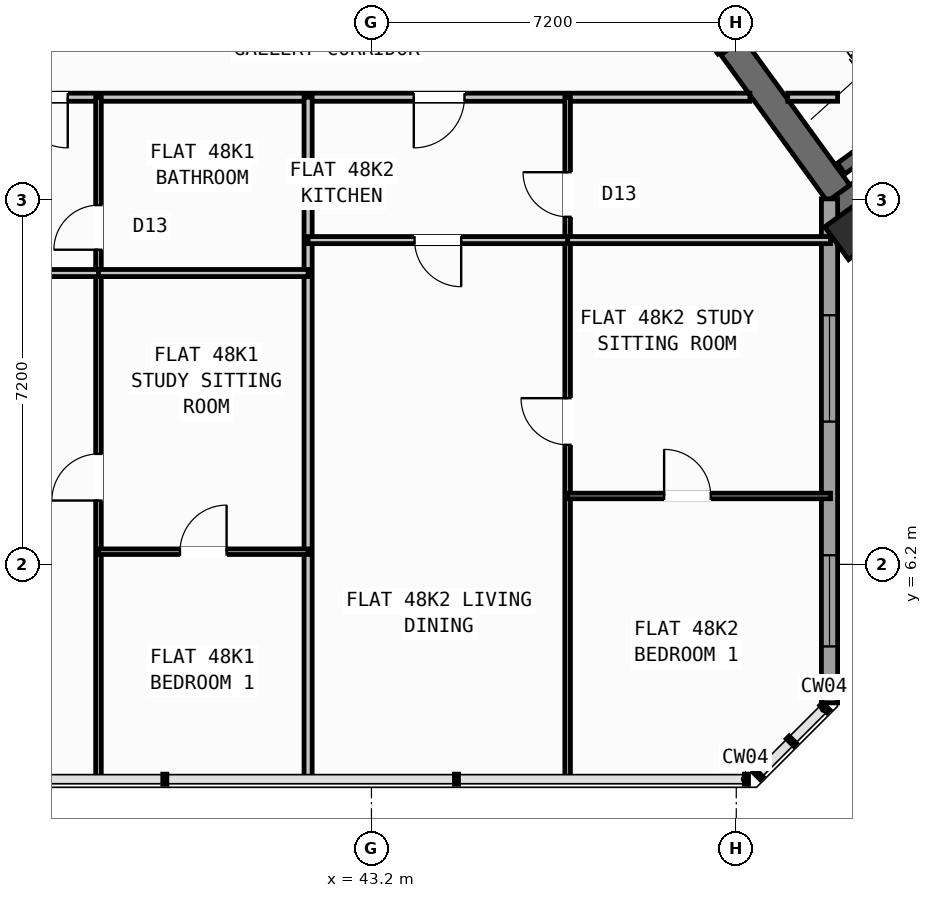
"""IFC4 building model, lengths in metres.
Left out: names, types, materials, properties, quantities, classifications, styles, units other than length and angle.
Written with IfcOpenShell. Run it as: python <this file> out.ifc"""

import sys

from ifc_helpers import new_model, si_unit, direction, frame, frame_2d, origin, origin_2d, place, context, subcontext, project, spatial, rectangle, hollow_rectangle, extrude, source, transform, mapped, element, fill, save


model = new_model("IFC4")
c1 = context("Model", 3, precision=1e-05, world=origin(), true_north=direction((0.0, 1.0)))
c2 = subcontext(c1, "Body", "Model", "MODEL_VIEW")
j1 = project(units=[si_unit("LENGTHUNIT", "METRE"), si_unit("PLANEANGLEUNIT", "RADIAN")], contexts=[c1])
p1 = place(None, origin())
s1 = spatial("IfcSite", under=j1, at=p1, CompositionType="ELEMENT")
p2 = place(p1, origin())
s2 = spatial("IfcBuilding", under=s1, at=p2, CompositionType="ELEMENT")
p3 = place(p2, frame((0.0, 0.0, 191.4)))
s3 = spatial("IfcBuildingStorey", under=s2, at=p3, CompositionType="ELEMENT", Elevation=191.4)
p4 = place(p3, frame((36.683, 18.304, 0.0), z_axis=(0.0, 0.0, 1.0), x_axis=(-0.529896466841, -0.848062341122, 0.0)))
e1 = element("IfcWall", 1, at=p4, inside=s3, PredefinedType="SHEAR", context=c2, shape_type="SweptSolid", body=[
    extrude(rectangle(XDim=6.425, YDim=0.55, at=frame_2d((3.212, 0.0))), origin(), (0.0, 0.0, 1.0), 3.32),
])
p5 = place(p3, frame((52.359, 13.14, 0.0), z_axis=(0.0, 0.0, 1.0), x_axis=(0.809014896919, 0.587788139183, 0.0)))
e2 = element("IfcWall", 2, at=p5, inside=s3, PredefinedType="SHEAR", context=c2, shape_type="SweptSolid", body=[
    extrude(rectangle(XDim=12.34, YDim=0.55, at=frame_2d((6.17, 0.0))), origin(), (0.0, 0.0, 1.0), 3.32),
])
p6 = place(p3, frame((52.42, 13.524, 0.0), z_axis=(0.0, 0.0, 1.0), x_axis=(-0.587802113096, 0.809004744015, 0.0)))
e3 = element("IfcWall", 3, at=p6, inside=s3, PredefinedType="SHEAR", context=c2, shape_type="SweptSolid", body=[
    extrude(rectangle(XDim=3.575, YDim=0.55, at=frame_2d((1.788, 0.0))), origin(), (0.0, 0.0, 1.0), 3.32),
])
m1 = source(origin(), c2, "Body", "SweptSolid", [
    extrude(hollow_rectangle(XDim=0.8, YDim=0.8, WallThickness=0.032, at=origin_2d()), origin(), (0.0, 0.0, 1.0), 3.6),
])
p7 = place(p3, frame((52.705, 12.773, 0.0), z_axis=(0.0, 0.0, 1.0), x_axis=(0.809016994375, 0.587785252292, 0.0)))
e4 = element("IfcColumn", 4, at=p7, inside=s3, PredefinedType="COLUMN", context=c2, shape_type="MappedRepresentation", body=[
    mapped(m1, transform((0.0, 0.0, 0.0), scale=1.0)),
])
p8 = place(p3, frame((52.24, 13.414, 0.0), z_axis=(0.0, 0.0, 1.0), x_axis=(0.0, -1.0, 0.0)))
e5 = element("IfcWall", 5, at=p8, inside=s3, PredefinedType="STANDARD", context=c2, shape_type="SweptSolid", body=[
    extrude(rectangle(XDim=9.948, YDim=0.32, at=frame_2d((4.974, 0.0))), origin(), (0.0, 0.0, 1.0), 3.32),
])
p9 = place(p8, frame((2.296, 0.0, 0.8)))
e6 = element("IfcOpeningElement", 6, at=p9, cuts=e5, PredefinedType="OPENING", context=c2, shape_type="SweptSolid", body=[
    extrude(rectangle(XDim=2.1, YDim=1.55, at=frame_2d((1.05, 0.775))), frame((0.0, 0.17, 0.0), z_axis=(0.0, -1.0, 0.0), x_axis=(1.0, 0.0, 0.0)), (0.0, 0.0, 1.0), 0.34),
])
p10 = place(p8, frame((7.033, 0.0, 0.85)))
e7 = element("IfcOpeningElement", 7, at=p10, cuts=e5, PredefinedType="OPENING", context=c2, shape_type="SweptSolid", body=[
    extrude(rectangle(XDim=1.8, YDim=1.5, at=frame_2d((0.9, 0.75))), frame((0.0, 0.17, 0.0), z_axis=(0.0, -1.0, 0.0), x_axis=(1.0, 0.0, 0.0)), (0.0, 0.0, 1.0), 0.34),
])
p11 = place(p3, frame((52.472, 14.013, 0.0), z_axis=(0.0, 0.0, 1.0), x_axis=(0.809028366311, 0.587769599847, 0.0)))
e8 = element("IfcWall", 8, at=p11, inside=s3, PredefinedType="SHEAR", context=c2, shape_type="SweptSolid", body=[
    extrude(rectangle(XDim=7.33, YDim=0.26, at=frame_2d((3.665, 0.0))), origin(), (0.0, 0.0, 1.0), 3.32),
])
p12 = place(p3, frame((35.237, 15.42, 0.0), z_axis=(0.0, 0.0, 1.0), x_axis=(1.0, 0.0, 0.0)))
e9 = element("IfcWall", 9, at=p12, inside=s3, PredefinedType="PARTITIONING", context=c2, shape_type="SweptSolid", body=[
    extrude(rectangle(XDim=15.432, YDim=0.16, at=frame_2d((7.716, 0.0))), origin(), (0.0, 0.0, 1.0), 3.31),
])
p13 = place(p12, frame((0.969, 0.0, 0.0)))
e10 = element("IfcOpeningElement", 10, at=p13, cuts=e9, PredefinedType="OPENING", context=c2, shape_type="SweptSolid", body=[
    extrude(rectangle(XDim=1.0, YDim=2.1, at=frame_2d((0.5, 1.05))), frame((0.0, 0.09, 0.0), z_axis=(0.0, -1.0, 0.0), x_axis=(1.0, 0.0, 0.0)), (0.0, 0.0, 1.0), 0.18),
])
p14 = place(p12, frame((8.799, 0.0, 0.0)))
e11 = element("IfcOpeningElement", 11, at=p14, cuts=e9, PredefinedType="OPENING", context=c2, shape_type="SweptSolid", body=[
    extrude(rectangle(XDim=1.0, YDim=2.1, at=frame_2d((0.5, 1.05))), frame((0.0, 0.09, 0.0), z_axis=(0.0, -1.0, 0.0), x_axis=(1.0, 0.0, 0.0)), (0.0, 0.0, 1.0), 0.18),
])
p15 = place(p3, frame((51.416, 15.42, 0.0), z_axis=(0.0, 0.0, 1.0), x_axis=(1.0, 0.0, 0.0)))
e12 = element("IfcWall", 12, at=p15, inside=s3, PredefinedType="PARTITIONING", context=c2, shape_type="SweptSolid", body=[
    extrude(rectangle(XDim=0.984, YDim=0.16, at=frame_2d((0.492, 0.0))), origin(), (0.0, 0.0, 1.0), 3.31),
])
p16 = place(p3, frame((50.119, 16.333, 0.0), z_axis=(0.0, 0.0, 1.0), x_axis=(-0.587749856981, 0.809042709391, 0.0)))
e13 = element("IfcWall", 13, at=p16, inside=s3, PredefinedType="STANDARD", context=c2, shape_type="SweptSolid", body=[
    extrude(rectangle(XDim=2.96, YDim=0.2, at=frame_2d((1.48, 0.0))), origin(), (0.0, 0.0, 1.0), 3.31),
])
p17 = place(p16, frame((0.53, 0.0, 0.0)))
e14 = element("IfcOpeningElement", 14, at=p17, cuts=e13, PredefinedType="OPENING", context=c2, shape_type="SweptSolid", body=[
    extrude(rectangle(XDim=1.5, YDim=2.15, at=frame_2d((0.75, 1.075))), frame((0.0, 0.11, 0.0), z_axis=(0.0, -1.0, 0.0), x_axis=(1.0, 0.0, 0.0)), (0.0, 0.0, 1.0), 0.22),
])
p18 = place(p3, frame((41.95, 1.96, 0.0), z_axis=(0.0, 0.0, 1.0), x_axis=(0.0, 1.0, 0.0)))
e15 = element("IfcWall", 15, at=p18, inside=s3, PredefinedType="PARTITIONING", context=c2, shape_type="SweptSolid", body=[
    extrude(rectangle(XDim=13.46, YDim=0.16, at=frame_2d((6.73, 0.0))), origin(), (0.0, 0.0, 1.0), 3.31),
])
p19 = place(p3, frame((37.813, 1.96, 0.0), z_axis=(0.0, 0.0, 1.0), x_axis=(0.0, 1.0, 0.0)))
e16 = element("IfcWall", 16, at=p19, inside=s3, PredefinedType="PARTITIONING", context=c2, shape_type="SweptSolid", body=[
    extrude(rectangle(XDim=13.46, YDim=0.11, at=frame_2d((6.73, 0.0))), origin(), (0.0, 0.0, 1.0), 3.31),
])
p20 = place(p19, frame((5.5, 0.0, 0.0)))
e17 = element("IfcOpeningElement", 17, at=p20, cuts=e16, PredefinedType="OPENING", context=c2, shape_type="SweptSolid", body=[
    extrude(rectangle(XDim=0.92, YDim=2.08, at=frame_2d((0.46, 1.04))), frame((0.0, 0.065, 0.0), z_axis=(0.0, -1.0, 0.0), x_axis=(1.0, 0.0, 0.0)), (0.0, 0.0, 1.0), 0.13),
])
p21 = place(p19, frame((10.45, 0.0, 0.0)))
e18 = element("IfcOpeningElement", 18, at=p21, cuts=e16, PredefinedType="OPENING", context=c2, shape_type="SweptSolid", body=[
    extrude(rectangle(XDim=0.88, YDim=2.08, at=frame_2d((0.44, 1.04))), frame((0.0, 0.065, 0.0), z_axis=(0.0, -1.0, 0.0), x_axis=(1.0, 0.0, 0.0)), (0.0, 0.0, 1.0), 0.13),
])
p22 = place(p3, frame((33.447, 11.95, 0.0), z_axis=(0.0, 0.0, 1.0), x_axis=(1.0, 0.0, 0.0)))
e19 = element("IfcWall", 19, at=p22, inside=s3, PredefinedType="PLUMBINGWALL", context=c2, shape_type="SweptSolid", body=[
    extrude(rectangle(XDim=4.366, YDim=0.14, at=frame_2d((2.183, 0.0))), origin(), (0.0, 0.0, 1.0), 2.495),
])
p23 = place(p22, frame((1.05, 0.0, 0.0)))
e20 = element("IfcOpeningElement", 20, at=p23, cuts=e19, PredefinedType="OPENING", context=c2, shape_type="SweptSolid", body=[
    extrude(rectangle(XDim=0.92, YDim=2.08, at=frame_2d((0.46, 1.04))), frame((0.0, 0.08, 0.0), z_axis=(0.0, -1.0, 0.0), x_axis=(1.0, 0.0, 0.0)), (0.0, 0.0, 1.0), 0.16),
])
p24 = place(p3, frame((37.813, 11.95, 0.0), z_axis=(0.0, 0.0, 1.0), x_axis=(1.0, 0.0, 0.0)))
e21 = element("IfcWall", 21, at=p24, inside=s3, PredefinedType="PLUMBINGWALL", context=c2, shape_type="SweptSolid", body=[
    extrude(rectangle(XDim=4.137, YDim=0.14, at=frame_2d((2.068, 0.0))), origin(), (0.0, 0.0, 1.0), 2.495),
])
p25 = place(p3, frame((37.813, 6.45, 0.0), z_axis=(0.0, 0.0, 1.0), x_axis=(1.0, 0.0, 0.0)))
e22 = element("IfcWall", 22, at=p25, inside=s3, PredefinedType="PARTITIONING", context=c2, shape_type="SweptSolid", body=[
    extrude(rectangle(XDim=4.137, YDim=0.11, at=frame_2d((2.068, 0.0))), origin(), (0.0, 0.0, 1.0), 3.31),
])
p26 = place(p25, frame((1.608, 0.0, 0.0)))
e23 = element("IfcOpeningElement", 23, at=p26, cuts=e22, PredefinedType="OPENING", context=c2, shape_type="SweptSolid", body=[
    extrude(rectangle(XDim=0.92, YDim=2.08, at=frame_2d((0.46, 1.04))), frame((0.0, 0.065, 0.0), z_axis=(0.0, -1.0, 0.0), x_axis=(1.0, 0.0, 0.0)), (0.0, 0.0, 1.0), 0.13),
])
p27 = place(p3, frame((47.072, 1.96, 0.0), z_axis=(0.0, 0.0, 1.0), x_axis=(0.0, 1.0, 0.0)))
e24 = element("IfcWall", 24, at=p27, inside=s3, PredefinedType="PARTITIONING", context=c2, shape_type="SweptSolid", body=[
    extrude(rectangle(XDim=13.46, YDim=0.11, at=frame_2d((6.73, 0.0))), origin(), (0.0, 0.0, 1.0), 3.31),
])
p28 = place(p27, frame((6.6, 0.0, 0.0)))
e25 = element("IfcOpeningElement", 25, at=p28, cuts=e24, PredefinedType="OPENING", context=c2, shape_type="SweptSolid", body=[
    extrude(rectangle(XDim=0.92, YDim=2.08, at=frame_2d((0.46, 1.04))), frame((0.0, 0.065, 0.0), z_axis=(0.0, -1.0, 0.0), x_axis=(1.0, 0.0, 0.0)), (0.0, 0.0, 1.0), 0.13),
])
p29 = place(p27, frame((11.1, 0.0, 0.0)))
e26 = element("IfcOpeningElement", 26, at=p29, cuts=e24, PredefinedType="OPENING", context=c2, shape_type="SweptSolid", body=[
    extrude(rectangle(XDim=0.88, YDim=2.08, at=frame_2d((0.44, 1.04))), frame((0.0, 0.065, 0.0), z_axis=(0.0, -1.0, 0.0), x_axis=(1.0, 0.0, 0.0)), (0.0, 0.0, 1.0), 0.13),
])
p30 = place(p3, frame((41.95, 12.6, 0.0), z_axis=(0.0, 0.0, 1.0), x_axis=(1.0, 0.0, 0.0)))
e27 = element("IfcWall", 27, at=p30, inside=s3, PredefinedType="PLUMBINGWALL", context=c2, shape_type="SweptSolid", body=[
    extrude(rectangle(XDim=5.122, YDim=0.14, at=frame_2d((2.561, 0.0))), origin(), (0.0, 0.0, 1.0), 2.495),
])
p31 = place(p30, frame((2.101, 0.0, 0.0)))
e28 = element("IfcOpeningElement", 28, at=p31, cuts=e27, PredefinedType="OPENING", context=c2, shape_type="SweptSolid", body=[
    extrude(rectangle(XDim=0.92, YDim=2.08, at=frame_2d((0.46, 1.04))), frame((0.0, 0.08, 0.0), z_axis=(0.0, -1.0, 0.0), x_axis=(1.0, 0.0, 0.0)), (0.0, 0.0, 1.0), 0.16),
])
p32 = place(p3, frame((47.072, 12.6, 0.0), z_axis=(0.0, 0.0, 1.0), x_axis=(1.0, 0.0, 0.0)))
e29 = element("IfcWall", 29, at=p32, inside=s3, PredefinedType="PLUMBINGWALL", context=c2, shape_type="SweptSolid", body=[
    extrude(rectangle(XDim=5.188, YDim=0.14, at=frame_2d((2.594, 0.0))), origin(), (0.0, 0.0, 1.0), 2.495),
])
p33 = place(p3, frame((47.072, 7.55, 0.0), z_axis=(0.0, 0.0, 1.0), x_axis=(1.0, 0.0, 0.0)))
e30 = element("IfcWall", 30, at=p33, inside=s3, PredefinedType="PARTITIONING", context=c2, shape_type="SweptSolid", body=[
    extrude(rectangle(XDim=5.188, YDim=0.11, at=frame_2d((2.594, 0.0))), origin(), (0.0, 0.0, 1.0), 3.31),
])
p34 = place(p33, frame((1.904, 0.0, 0.0)))
e31 = element("IfcOpeningElement", 31, at=p34, cuts=e30, PredefinedType="OPENING", context=c2, shape_type="SweptSolid", body=[
    extrude(rectangle(XDim=0.92, YDim=2.08, at=frame_2d((0.46, 1.04))), frame((0.0, 0.065, 0.0), z_axis=(0.0, -1.0, 0.0), x_axis=(1.0, 0.0, 0.0)), (0.0, 0.0, 1.0), 0.13),
])
m2 = source(origin(), c2, "Body", "SweptSolid", [
    extrude(rectangle(XDim=2.1, YDim=1.55, at=frame_2d((1.05, 0.775))), frame((0.0, 0.03, 0.0), z_axis=(0.0, -1.0, 0.0), x_axis=(1.0, 0.0, 0.0)), (0.0, 0.0, 1.0), 0.06),
])
p35 = place(p9, origin())
e32 = element("IfcWindow", 32, at=p35, inside=s3, PartitioningType="SINGLE_PANEL", PredefinedType="WINDOW", context=c2, shape_type="MappedRepresentation", body=[
    mapped(m2, transform((0.0, 0.0, 0.0), scale=1.0)),
])
fill(e6, e32)
m3 = source(origin(), c2, "Body", "SweptSolid", [
    extrude(rectangle(XDim=1.8, YDim=1.5, at=frame_2d((0.9, 0.75))), frame((0.0, 0.03, 0.0), z_axis=(0.0, -1.0, 0.0), x_axis=(1.0, 0.0, 0.0)), (0.0, 0.0, 1.0), 0.06),
])
p36 = place(p10, origin())
e33 = element("IfcWindow", 33, at=p36, inside=s3, PartitioningType="SINGLE_PANEL", PredefinedType="WINDOW", context=c2, shape_type="MappedRepresentation", body=[
    mapped(m3, transform((0.0, 0.0, 0.0), scale=1.0)),
])
fill(e7, e33)
m4 = source(origin(), c2, "Body", "SweptSolid", [
    extrude(rectangle(XDim=0.92, YDim=2.08, at=frame_2d((0.46, 1.04))), frame((0.0, 0.025, 0.0), z_axis=(0.0, -1.0, 0.0), x_axis=(1.0, 0.0, 0.0)), (0.0, 0.0, 1.0), 0.05),
])
p37 = place(p20, origin())
e34 = element("IfcDoor", 34, at=p37, inside=s3, OperationType="SINGLE_SWING_LEFT", PredefinedType="DOOR", context=c2, shape_type="MappedRepresentation", body=[
    mapped(m4, transform((0.0, 0.0, 0.0), scale=1.0)),
])
fill(e17, e34)
p38 = place(p26, origin())
e35 = element("IfcDoor", 35, at=p38, inside=s3, OperationType="SINGLE_SWING_RIGHT", PredefinedType="DOOR", context=c2, shape_type="MappedRepresentation", body=[
    mapped(m4, transform((0.0, 0.0, 0.0), scale=1.0)),
])
fill(e23, e35)
m5 = source(origin(), c2, "Body", "SweptSolid", [
    extrude(rectangle(XDim=1.0, YDim=2.1, at=frame_2d((0.5, 1.05))), frame((0.0, 0.025, 0.0), z_axis=(0.0, -1.0, 0.0), x_axis=(1.0, 0.0, 0.0)), (0.0, 0.0, 1.0), 0.05),
])
p39 = place(p13, frame((1.0, 0.0, 0.0), z_axis=(0.0, 0.0, 1.0), x_axis=(-1.0, 0.0, 0.0)))
e36 = element("IfcDoor", 36, at=p39, inside=s3, OperationType="SINGLE_SWING_LEFT", PredefinedType="DOOR", context=c2, shape_type="MappedRepresentation", body=[
    mapped(m5, transform((0.0, 0.0, 0.0), scale=1.0)),
])
fill(e10, e36)
m6 = source(origin(), c2, "Body", "SweptSolid", [
    extrude(rectangle(XDim=0.88, YDim=2.08, at=frame_2d((0.44, 1.04))), frame((0.0, 0.025, 0.0), z_axis=(0.0, -1.0, 0.0), x_axis=(1.0, 0.0, 0.0)), (0.0, 0.0, 1.0), 0.05),
])
p40 = place(p21, origin())
e37 = element("IfcDoor", 37, at=p40, inside=s3, OperationType="SINGLE_SWING_LEFT", PredefinedType="DOOR", context=c2, shape_type="MappedRepresentation", body=[
    mapped(m6, transform((0.0, 0.0, 0.0), scale=1.0)),
])
fill(e18, e37)
p41 = place(p28, origin())
e38 = element("IfcDoor", 38, at=p41, inside=s3, OperationType="SINGLE_SWING_RIGHT", PredefinedType="DOOR", context=c2, shape_type="MappedRepresentation", body=[
    mapped(m4, transform((0.0, 0.0, 0.0), scale=1.0)),
])
fill(e25, e38)
p42 = place(p34, origin())
e39 = element("IfcDoor", 39, at=p42, inside=s3, OperationType="SINGLE_SWING_LEFT", PredefinedType="DOOR", context=c2, shape_type="MappedRepresentation", body=[
    mapped(m4, transform((0.0, 0.0, 0.0), scale=1.0)),
])
fill(e31, e39)
p43 = place(p14, frame((1.0, 0.0, 0.0), z_axis=(0.0, 0.0, 1.0), x_axis=(-1.0, 0.0, 0.0)))
e40 = element("IfcDoor", 40, at=p43, inside=s3, OperationType="SINGLE_SWING_RIGHT", PredefinedType="DOOR", context=c2, shape_type="MappedRepresentation", body=[
    mapped(m5, transform((0.0, 0.0, 0.0), scale=1.0)),
])
fill(e11, e40)
p44 = place(p31, frame((0.92, 0.0, 0.0), z_axis=(0.0, 0.0, 1.0), x_axis=(-1.0, 0.0, 0.0)))
e41 = element("IfcDoor", 41, at=p44, inside=s3, OperationType="SINGLE_SWING_LEFT", PredefinedType="DOOR", context=c2, shape_type="MappedRepresentation", body=[
    mapped(m4, transform((0.0, 0.0, 0.0), scale=1.0)),
])
fill(e28, e41)
p45 = place(p29, origin())
e42 = element("IfcDoor", 42, at=p45, inside=s3, OperationType="SINGLE_SWING_RIGHT", PredefinedType="DOOR", context=c2, shape_type="MappedRepresentation", body=[
    mapped(m6, transform((0.0, 0.0, 0.0), scale=1.0)),
])
fill(e26, e42)
save(model, sys.argv[1])
